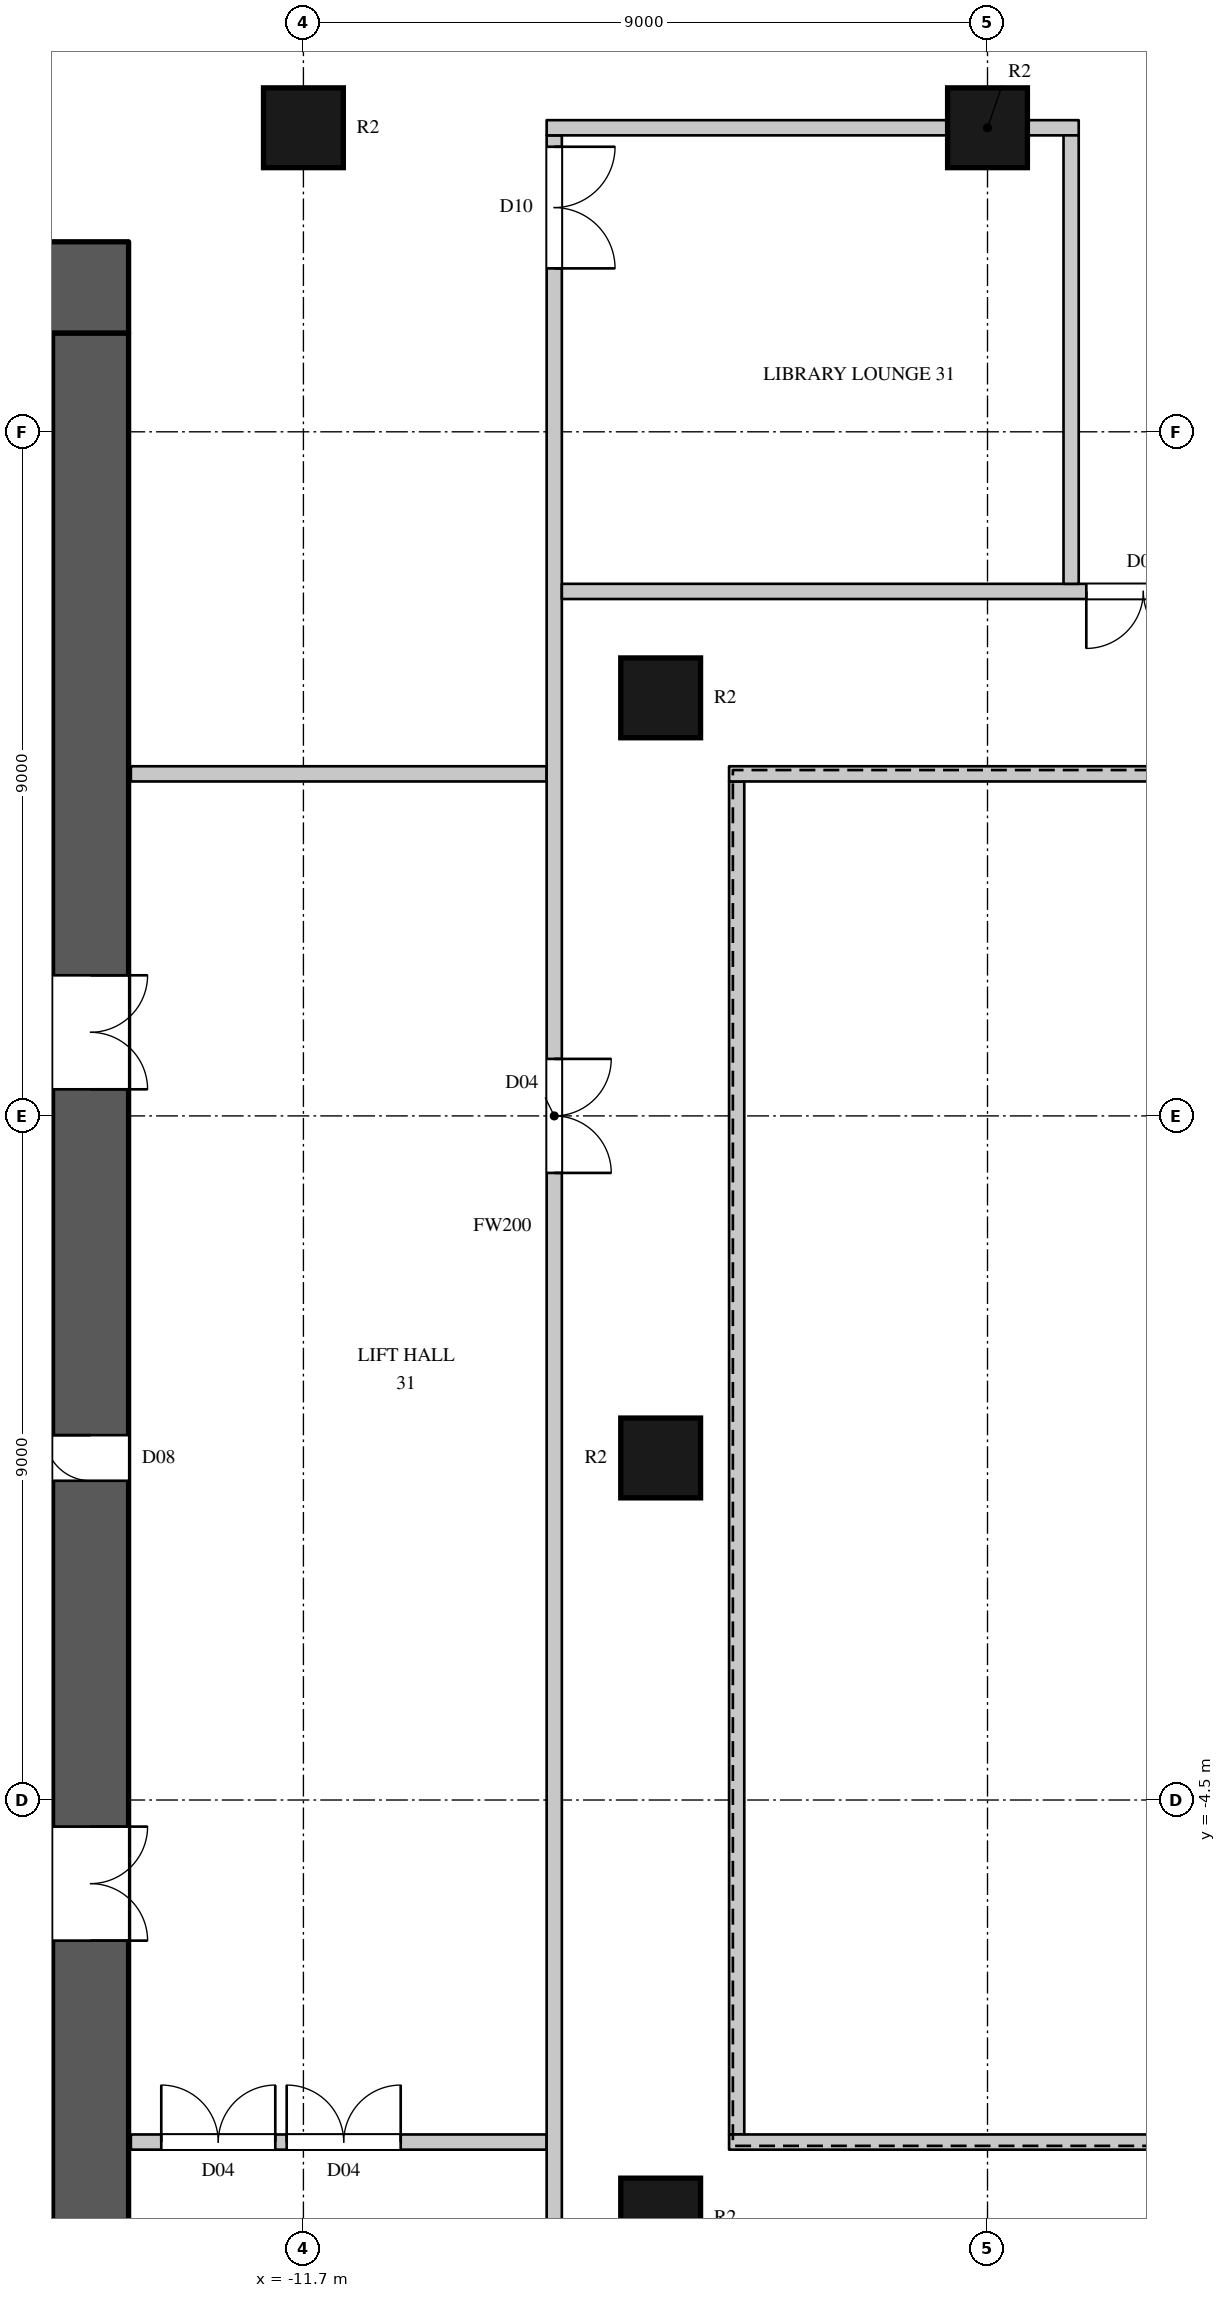
"""IFC4 building model, lengths in metres.
Left out: names, types, materials, properties, quantities, classifications, styles, units other than length and angle.
Written with IfcOpenShell. Run it as: python <this file> out.ifc"""

import sys

from ifc_helpers import new_model, si_unit, direction, frame, frame_2d, origin, origin_2d, place, context, subcontext, project, spatial, rectangle, circle, extrude, element, fill, save


model = new_model("IFC4")
c1 = context("Model", 3, precision=1e-05, world=origin(), true_north=direction((0.0, 1.0)))
c2 = subcontext(c1, "Body", "Model", "MODEL_VIEW")
j1 = project(units=[si_unit("LENGTHUNIT", "METRE"), si_unit("PLANEANGLEUNIT", "RADIAN")], contexts=[c1])
p1 = place(None, origin())
s1 = spatial("IfcSite", under=j1, at=p1, CompositionType="ELEMENT")
p2 = place(p1, origin())
s2 = spatial("IfcBuilding", under=s1, at=p2, CompositionType="ELEMENT")
p3 = place(p2, frame((0.0, 0.0, 141.9)))
s3 = spatial("IfcBuildingStorey", under=s2, at=p3, CompositionType="ELEMENT", Elevation=141.9)
for number, where, z_axis, x_axis in (
    (1, (-11.7, 17.5, 0.0), (0.0, 0.0, 1.0), (1.0, 0.0, 0.0)),
    (2, (-2.7, 17.5, 0.0), (0.0, 0.0, 1.0), (1.0, 0.0, 0.0)),
    (3, (-7.0, -10.0, 0.0), (0.0, 0.0, 1.0), (1.0, 0.0, 0.0)),
    (4, (-7.0, 0.0, 0.0), (0.0, 0.0, 1.0), (1.0, 0.0, 0.0)),
    (5, (-7.0, 10.0, 0.0), (0.0, 0.0, 1.0), (1.0, 0.0, 0.0)),
):
    element("IfcColumn", number, at=place(p3, frame(where, z_axis=z_axis, x_axis=x_axis)), inside=s3, PredefinedType="COLUMN", context=c2, shape_type="SweptSolid", body=[
        extrude(circle(Radius=0.525, at=origin_2d()), origin(), (0.0, 0.0, 1.0), 3.6),
    ])
p4 = place(p3, frame((-30.0, 15.4, 0.0), z_axis=(0.0, 0.0, 1.0), x_axis=(1.0, 0.0, 0.0)))
e6 = element("IfcWall", 6, at=p4, inside=s3, PredefinedType="SHEAR", context=c2, shape_type="SweptSolid", body=[
    extrude(rectangle(XDim=16.0, YDim=1.2, at=frame_2d((8.0, 0.0))), origin(), (0.0, 0.0, 1.0), 3.6),
])
p5 = place(p4, frame((13.4, 0.0, 0.0)))
e7 = element("IfcOpeningElement", 7, at=p5, cuts=e6, PredefinedType="OPENING", context=c2, shape_type="SweptSolid", body=[
    extrude(rectangle(XDim=1.5, YDim=2.4, at=frame_2d((0.75, 1.2))), frame((0.0, 0.61, 0.0), z_axis=(0.0, -1.0, 0.0), x_axis=(1.0, 0.0, 0.0)), (0.0, 0.0, 1.0), 1.22),
])
p6 = place(p3, frame((-14.5, -14.8, 0.0), z_axis=(0.0, 0.0, 1.0), x_axis=(0.0, 1.0, 0.0)))
e8 = element("IfcWall", 8, at=p6, inside=s3, PredefinedType="SHEAR", context=c2, shape_type="SweptSolid", body=[
    extrude(rectangle(XDim=29.6, YDim=1.0, at=frame_2d((14.8, 0.0))), origin(), (0.0, 0.0, 1.0), 3.6),
])
p7 = place(p6, frame((8.45, 0.0, 0.0)))
e9 = element("IfcOpeningElement", 9, at=p7, cuts=e8, PredefinedType="OPENING", context=c2, shape_type="SweptSolid", body=[
    extrude(rectangle(XDim=1.5, YDim=2.4, at=frame_2d((0.75, 1.2))), frame((0.0, 0.51, 0.0), z_axis=(0.0, -1.0, 0.0), x_axis=(1.0, 0.0, 0.0)), (0.0, 0.0, 1.0), 1.02),
])
p8 = place(p6, frame((19.65, 0.0, 0.0)))
e10 = element("IfcOpeningElement", 10, at=p8, cuts=e8, PredefinedType="OPENING", context=c2, shape_type="SweptSolid", body=[
    extrude(rectangle(XDim=1.5, YDim=2.4, at=frame_2d((0.75, 1.2))), frame((0.0, 0.51, 0.0), z_axis=(0.0, -1.0, 0.0), x_axis=(1.0, 0.0, 0.0)), (0.0, 0.0, 1.0), 1.02),
])
p9 = place(p6, frame((14.5, 0.0, 0.0)))
e11 = element("IfcOpeningElement", 11, at=p9, cuts=e8, PredefinedType="OPENING", context=c2, shape_type="SweptSolid", body=[
    extrude(rectangle(XDim=0.6, YDim=2.0, at=frame_2d((0.3, 1.0))), frame((0.0, 0.51, 0.0), z_axis=(0.0, -1.0, 0.0), x_axis=(1.0, 0.0, 0.0)), (0.0, 0.0, 1.0), 1.02),
])
p10 = place(p3, frame((-13.97, -9.0, 0.0), z_axis=(0.0, 0.0, 1.0), x_axis=(1.0, 0.0, 0.0)))
e12 = element("IfcWall", 12, at=p10, inside=s3, PredefinedType="PARTITIONING", context=c2, shape_type="SweptSolid", body=[
    extrude(rectangle(XDim=5.47, YDim=0.2, at=frame_2d((2.735, 0.0))), origin(), (0.0, 0.0, 1.0), 3.3),
])
p11 = place(p10, frame((0.4, 0.0, 0.0)))
e13 = element("IfcOpeningElement", 13, at=p11, cuts=e12, PredefinedType="OPENING", context=c2, shape_type="SweptSolid", body=[
    extrude(rectangle(XDim=1.5, YDim=2.2, at=frame_2d((0.75, 1.1))), frame((0.0, 0.11, 0.0), z_axis=(0.0, -1.0, 0.0), x_axis=(1.0, 0.0, 0.0)), (0.0, 0.0, 1.0), 0.22),
])
p12 = place(p10, frame((2.05, 0.0, 0.0)))
e14 = element("IfcOpeningElement", 14, at=p12, cuts=e12, PredefinedType="OPENING", context=c2, shape_type="SweptSolid", body=[
    extrude(rectangle(XDim=1.5, YDim=2.2, at=frame_2d((0.75, 1.1))), frame((0.0, 0.11, 0.0), z_axis=(0.0, -1.0, 0.0), x_axis=(1.0, 0.0, 0.0)), (0.0, 0.0, 1.0), 0.22),
])
p13 = place(p3, frame((-13.97, 9.0, 0.0), z_axis=(0.0, 0.0, 1.0), x_axis=(1.0, 0.0, 0.0)))
e15 = element("IfcWall", 15, at=p13, inside=s3, PredefinedType="PARTITIONING", context=c2, shape_type="SweptSolid", body=[
    extrude(rectangle(XDim=5.47, YDim=0.2, at=frame_2d((2.735, 0.0))), origin(), (0.0, 0.0, 1.0), 3.3),
])
p14 = place(p3, frame((-8.4, -11.3, 0.0), z_axis=(0.0, 0.0, 1.0), x_axis=(0.0, 1.0, 0.0)))
e16 = element("IfcWall", 16, at=p14, inside=s3, PredefinedType="PARTITIONING", context=c2, shape_type="SweptSolid", body=[
    extrude(rectangle(XDim=28.7, YDim=0.2, at=frame_2d((14.35, 0.0))), origin(), (0.0, 0.0, 1.0), 3.3),
])
p15 = place(p14, frame((15.05, 0.0, 0.0)))
e17 = element("IfcOpeningElement", 17, at=p15, cuts=e16, PredefinedType="OPENING", context=c2, shape_type="SweptSolid", body=[
    extrude(rectangle(XDim=1.5, YDim=2.2, at=frame_2d((0.75, 1.1))), frame((0.0, 0.11, 0.0), z_axis=(0.0, -1.0, 0.0), x_axis=(1.0, 0.0, 0.0)), (0.0, 0.0, 1.0), 0.22),
])
p16 = place(p14, frame((26.95, 0.0, 0.0)))
e18 = element("IfcOpeningElement", 18, at=p16, cuts=e16, PredefinedType="OPENING", context=c2, shape_type="SweptSolid", body=[
    extrude(rectangle(XDim=1.6, YDim=2.4, at=frame_2d((0.8, 1.2))), frame((0.0, 0.11, 0.0), z_axis=(0.0, -1.0, 0.0), x_axis=(1.0, 0.0, 0.0)), (0.0, 0.0, 1.0), 0.22),
])
p17 = place(p3, frame((-8.3, 11.4, 0.0), z_axis=(0.0, 0.0, 1.0), x_axis=(1.0, 0.0, 0.0)))
e19 = element("IfcWall", 19, at=p17, inside=s3, PredefinedType="PARTITIONING", context=c2, shape_type="SweptSolid", body=[
    extrude(rectangle(XDim=18.7, YDim=0.2, at=frame_2d((9.35, 0.0))), origin(), (0.0, 0.0, 1.0), 3.3),
])
p18 = place(p17, frame((6.9, 0.0, 0.0)))
e20 = element("IfcOpeningElement", 20, at=p18, cuts=e19, PredefinedType="OPENING", context=c2, shape_type="SweptSolid", body=[
    extrude(rectangle(XDim=1.5, YDim=2.2, at=frame_2d((0.75, 1.1))), frame((0.0, 0.11, 0.0), z_axis=(0.0, -1.0, 0.0), x_axis=(1.0, 0.0, 0.0)), (0.0, 0.0, 1.0), 0.22),
])
p19 = place(p3, frame((-8.5, 17.5, 0.0), z_axis=(0.0, 0.0, 1.0), x_axis=(1.0, 0.0, 0.0)))
e21 = element("IfcWall", 21, at=p19, inside=s3, PredefinedType="PARTITIONING", context=c2, shape_type="SweptSolid", body=[
    extrude(rectangle(XDim=5.275, YDim=0.2, at=frame_2d((2.637, 0.0))), origin(), (0.0, 0.0, 1.0), 2.75),
])
p20 = place(p3, frame((-2.175, 17.5, 0.0), z_axis=(0.0, 0.0, 1.0), x_axis=(1.0, 0.0, 0.0)))
e22 = element("IfcWall", 22, at=p20, inside=s3, PredefinedType="PARTITIONING", context=c2, shape_type="SweptSolid", body=[
    extrude(rectangle(XDim=0.675, YDim=0.2, at=frame_2d((0.337, 0.0))), origin(), (0.0, 0.0, 1.0), 2.75),
])
p21 = place(p3, frame((-6.0, -8.9, 0.0), z_axis=(0.0, 0.0, 1.0), x_axis=(0.0, 1.0, 0.0)))
e23 = element("IfcWall", 23, at=p21, inside=s3, PredefinedType="PARTITIONING", context=c2, shape_type="SweptSolid", body=[
    extrude(rectangle(XDim=17.8, YDim=0.2, at=frame_2d((8.9, 0.0))), origin(), (0.0, 0.0, 1.0), 3.3),
])
for number, where, z_axis, x_axis in (
    (24, (-6.1, -9.0, 0.0), (0.0, 0.0, 1.0), (1.0, 0.0, 0.0)),
    (25, (-6.1, 9.0, 0.0), (0.0, 0.0, 1.0), (1.0, 0.0, 0.0)),
):
    element("IfcWall", number, at=place(p3, frame(where, z_axis=z_axis, x_axis=x_axis)), inside=s3, PredefinedType="PARTITIONING", context=c2, shape_type="SweptSolid", body=[
        extrude(rectangle(XDim=14.2, YDim=0.2, at=frame_2d((7.1, 0.0))), origin(), (0.0, 0.0, 1.0), 3.3),
    ])
p22 = place(p3, frame((-1.6, 11.5, 0.0), z_axis=(0.0, 0.0, 1.0), x_axis=(0.0, 1.0, 0.0)))
e26 = element("IfcWall", 26, at=p22, inside=s3, PredefinedType="PARTITIONING", context=c2, shape_type="SweptSolid", body=[
    extrude(rectangle(XDim=5.9, YDim=0.2, at=frame_2d((2.95, 0.0))), origin(), (0.0, 0.0, 1.0), 3.3),
])
p23 = place(p15, origin())
e27 = element("IfcDoor", 27, at=p23, inside=s3, OperationType="DOUBLE_DOOR_SINGLE_SWING", PredefinedType="DOOR", context=c2, shape_type="SweptSolid", body=[
    extrude(rectangle(XDim=1.5, YDim=2.2, at=frame_2d((0.75, 1.1))), frame((0.0, 0.025, 0.0), z_axis=(0.0, -1.0, 0.0), x_axis=(1.0, 0.0, 0.0)), (0.0, 0.0, 1.0), 0.05),
])
fill(e17, e27)
p24 = place(p11, origin())
e28 = element("IfcDoor", 28, at=p24, inside=s3, OperationType="DOUBLE_DOOR_SINGLE_SWING", PredefinedType="DOOR", context=c2, shape_type="SweptSolid", body=[
    extrude(rectangle(XDim=1.5, YDim=2.2, at=frame_2d((0.75, 1.1))), frame((0.0, 0.025, 0.0), z_axis=(0.0, -1.0, 0.0), x_axis=(1.0, 0.0, 0.0)), (0.0, 0.0, 1.0), 0.05),
])
fill(e13, e28)
p25 = place(p12, origin())
e29 = element("IfcDoor", 29, at=p25, inside=s3, OperationType="DOUBLE_DOOR_SINGLE_SWING", PredefinedType="DOOR", context=c2, shape_type="SweptSolid", body=[
    extrude(rectangle(XDim=1.5, YDim=2.2, at=frame_2d((0.75, 1.1))), frame((0.0, 0.025, 0.0), z_axis=(0.0, -1.0, 0.0), x_axis=(1.0, 0.0, 0.0)), (0.0, 0.0, 1.0), 0.05),
])
fill(e14, e29)
p26 = place(p18, origin())
e30 = element("IfcDoor", 30, at=p26, inside=s3, OperationType="DOUBLE_DOOR_SINGLE_SWING", PredefinedType="DOOR", context=c2, shape_type="SweptSolid", body=[
    extrude(rectangle(XDim=1.5, YDim=2.2, at=frame_2d((0.75, 1.1))), frame((0.0, 0.025, 0.0), z_axis=(0.0, -1.0, 0.0), x_axis=(1.0, 0.0, 0.0)), (0.0, 0.0, 1.0), 0.05),
])
fill(e20, e30)
p27 = place(p16, origin())
e31 = element("IfcDoor", 31, at=p27, inside=s3, OperationType="DOUBLE_DOOR_SINGLE_SWING", PredefinedType="DOOR", context=c2, shape_type="SweptSolid", body=[
    extrude(rectangle(XDim=1.6, YDim=2.4, at=frame_2d((0.8, 1.2))), frame((0.0, 0.025, 0.0), z_axis=(0.0, -1.0, 0.0), x_axis=(1.0, 0.0, 0.0)), (0.0, 0.0, 1.0), 0.05),
])
fill(e18, e31)
p28 = place(p7, origin())
e32 = element("IfcDoor", 32, at=p28, inside=s3, OperationType="DOUBLE_DOOR_SINGLE_SWING", PredefinedType="DOOR", context=c2, shape_type="SweptSolid", body=[
    extrude(rectangle(XDim=1.5, YDim=2.4, at=frame_2d((0.75, 1.2))), frame((0.0, -0.445, 0.0), z_axis=(0.0, -1.0, 0.0), x_axis=(1.0, 0.0, 0.0)), (0.0, 0.0, 1.0), 0.05),
])
fill(e9, e32)
p29 = place(p8, origin())
e33 = element("IfcDoor", 33, at=p29, inside=s3, OperationType="DOUBLE_DOOR_SINGLE_SWING", PredefinedType="DOOR", context=c2, shape_type="SweptSolid", body=[
    extrude(rectangle(XDim=1.5, YDim=2.4, at=frame_2d((0.75, 1.2))), frame((0.0, -0.445, 0.0), z_axis=(0.0, -1.0, 0.0), x_axis=(1.0, 0.0, 0.0)), (0.0, 0.0, 1.0), 0.05),
])
fill(e10, e33)
p30 = place(p9, origin())
e34 = element("IfcDoor", 34, at=p30, inside=s3, OperationType="SINGLE_SWING_RIGHT", PredefinedType="DOOR", context=c2, shape_type="SweptSolid", body=[
    extrude(rectangle(XDim=0.6, YDim=2.0, at=frame_2d((0.3, 1.0))), frame((0.0, 0.495, 0.0), z_axis=(0.0, -1.0, 0.0), x_axis=(1.0, 0.0, 0.0)), (0.0, 0.0, 1.0), 0.05),
])
fill(e11, e34)
save(model, sys.argv[1])
